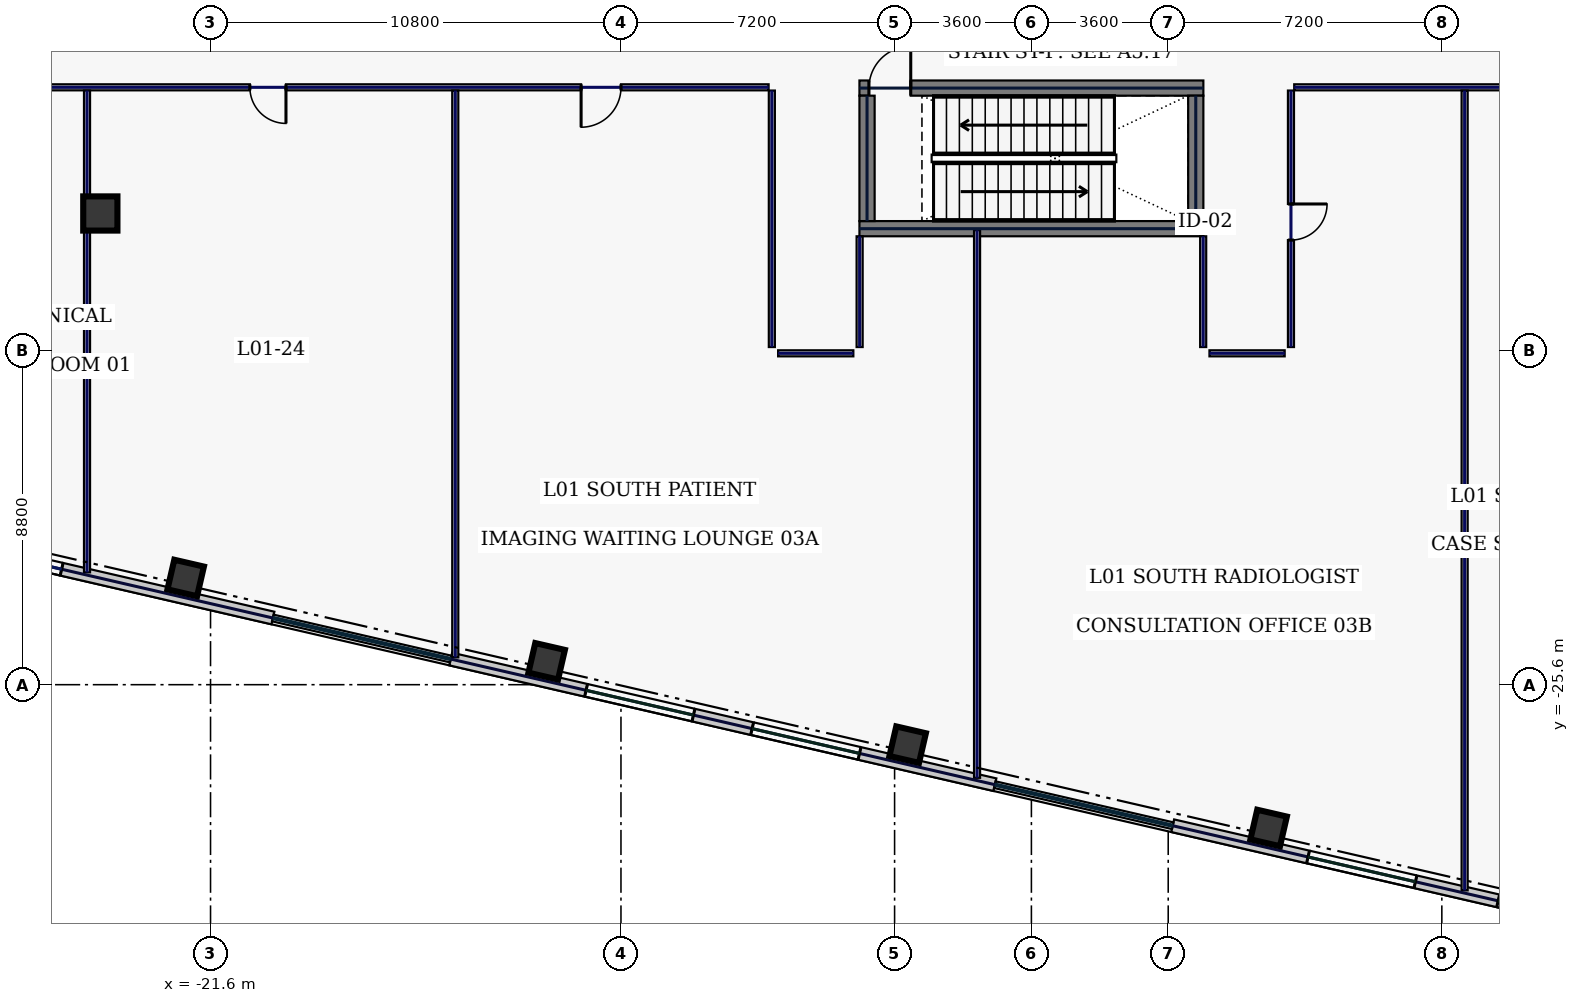
"""IFC4 building model, lengths in metres.
Left out: names, types, materials, properties, quantities, classifications, styles, units other than length and angle.
Written with IfcOpenShell. Run it as: python <this file> out.ifc"""

import sys

from ifc_helpers import new_model, si_unit, direction, frame, frame_2d, origin, origin_2d, place, context, subcontext, project, spatial, rectangle, hollow_rectangle, extrude, element, fill, save


model = new_model("IFC4")
c1 = context("Model", 3, precision=1e-05, world=origin(), true_north=direction((0.0, 1.0)))
c2 = subcontext(c1, "Body", "Model", "MODEL_VIEW")
j1 = project(units=[si_unit("LENGTHUNIT", "METRE"), si_unit("PLANEANGLEUNIT", "RADIAN")], contexts=[c1])
p1 = place(None, origin())
s1 = spatial("IfcSite", under=j1, at=p1, CompositionType="ELEMENT")
p2 = place(p1, origin())
s2 = spatial("IfcBuilding", under=s1, at=p2, CompositionType="ELEMENT")
p3 = place(p2, frame((0.0, 0.0, 8.4)))
s3 = spatial("IfcBuildingStorey", under=s2, at=p3, CompositionType="ELEMENT", Elevation=8.4)
p4 = place(p3, frame((-4.525, -13.6, 0.0), z_axis=(0.0, 0.0, 1.0), x_axis=(1.0, 0.0, 0.0)))
e1 = element("IfcWall", 1, at=p4, inside=s3, PredefinedType="SHEAR", context=c2, shape_type="SweptSolid", body=[
    extrude(rectangle(XDim=9.05, YDim=0.4, at=frame_2d((4.525, 0.0))), origin(), (0.0, 0.0, 1.0), 4.7),
])
p5 = place(p3, frame((-4.525, -9.9, 0.0), z_axis=(0.0, 0.0, 1.0), x_axis=(1.0, 0.0, 0.0)))
e2 = element("IfcWall", 2, at=p5, inside=s3, PredefinedType="SHEAR", context=c2, shape_type="SweptSolid", body=[
    extrude(rectangle(XDim=9.05, YDim=0.4, at=frame_2d((4.525, 0.0))), origin(), (0.0, 0.0, 1.0), 4.7),
])
p6 = place(p5, frame((0.25, 0.0, 0.0)))
e3 = element("IfcOpeningElement", 3, at=p6, cuts=e2, PredefinedType="OPENING", context=c2, shape_type="SweptSolid", body=[
    extrude(rectangle(XDim=1.1, YDim=2.2, at=frame_2d((0.55, 1.1))), frame((0.0, 0.21, 0.0), z_axis=(0.0, -1.0, 0.0), x_axis=(1.0, 0.0, 0.0)), (0.0, 0.0, 1.0), 0.42),
])
for number, where, z_axis, x_axis in (
    (4, (-4.325, -13.4, 0.0), (0.0, 0.0, 1.0), (0.0, 1.0, 0.0)),
    (5, (4.325, -13.4, 0.0), (0.0, 0.0, 1.0), (0.0, 1.0, 0.0)),
):
    element("IfcWall", number, at=place(p3, frame(where, z_axis=z_axis, x_axis=x_axis)), inside=s3, PredefinedType="SHEAR", context=c2, shape_type="SweptSolid", body=[
        extrude(rectangle(XDim=3.3, YDim=0.4, at=frame_2d((1.65, 0.0))), origin(), (0.0, 0.0, 1.0), 4.7),
    ])
p7 = place(p3, frame((-24.5, -13.2, 0.0), z_axis=(0.0, 0.0, 1.0), x_axis=(1.0, 0.0, 0.0)))
e6 = element("IfcColumn", 6, at=p7, inside=s3, PredefinedType="COLUMN", context=c2, shape_type="SweptSolid", body=[
    extrude(hollow_rectangle(XDim=0.9, YDim=0.9, WallThickness=0.04, at=origin_2d()), origin(), (0.0, 0.0, 1.0), 4.7),
])
for number, where, z_axis, x_axis in (
    (7, (-22.254, -22.792, 0.0), (0.0, 0.0, 1.0), (0.974, -0.225, 0.0)),
    (8, (-12.755, -24.985, 0.0), (0.0, 0.0, 1.0), (0.974, -0.225, 0.0)),
    (9, (-3.256, -27.178, 0.0), (0.0, 0.0, 1.0), (0.974, -0.225, 0.0)),
    (10, (6.242, -29.371, 0.0), (0.0, 0.0, 1.0), (0.974, -0.225, 0.0)),
):
    element("IfcColumn", number, at=place(p3, frame(where, z_axis=z_axis, x_axis=x_axis)), inside=s3, PredefinedType="COLUMN", context=c2, shape_type="SweptSolid", body=[
        extrude(hollow_rectangle(XDim=0.8, YDim=0.8, WallThickness=0.036, at=origin_2d()), origin(), (0.0, 0.0, 1.0), 4.7),
    ])
p8 = place(p3, frame((-42.029, -18.75, 0.0), z_axis=(0.0, 0.0, 1.0), x_axis=(0.97436993772, -0.224951604723, 0.0)))
e11 = element("IfcWall", 11, at=p8, inside=s3, PredefinedType="STANDARD", context=c2, shape_type="SweptSolid", body=[
    extrude(rectangle(XDim=22.651, YDim=0.34, at=frame_2d((11.326, 0.0))), origin(), (0.0, 0.0, 1.0), 4.7),
])
p9 = place(p8, frame((1.862, 0.0, 0.85)))
e12 = element("IfcOpeningElement", 12, at=p9, cuts=e11, PredefinedType="OPENING", context=c2, shape_type="SweptSolid", body=[
    extrude(rectangle(XDim=2.9, YDim=2.3, at=frame_2d((1.45, 1.15))), frame((0.0, 0.18, 0.0), z_axis=(0.0, -1.0, 0.0), x_axis=(1.0, 0.0, 0.0)), (0.0, 0.0, 1.0), 0.36),
])
p10 = place(p8, frame((6.346, 0.0, 0.85)))
e13 = element("IfcOpeningElement", 13, at=p10, cuts=e11, PredefinedType="OPENING", context=c2, shape_type="SweptSolid", body=[
    extrude(rectangle(XDim=2.9, YDim=2.3, at=frame_2d((1.45, 1.15))), frame((0.0, 0.18, 0.0), z_axis=(0.0, -1.0, 0.0), x_axis=(1.0, 0.0, 0.0)), (0.0, 0.0, 1.0), 0.36),
])
p11 = place(p8, frame((13.661, 0.0, 0.85)))
e14 = element("IfcOpeningElement", 14, at=p11, cuts=e11, PredefinedType="OPENING", context=c2, shape_type="SweptSolid", body=[
    extrude(rectangle(XDim=0.85, YDim=1.85, at=frame_2d((0.425, 0.925))), frame((0.0, 0.18, 0.0), z_axis=(0.0, -1.0, 0.0), x_axis=(1.0, 0.0, 0.0)), (0.0, 0.0, 1.0), 0.36),
])
p12 = place(p8, frame((16.095, 0.0, 0.85)))
e15 = element("IfcOpeningElement", 15, at=p12, cuts=e11, PredefinedType="OPENING", context=c2, shape_type="SweptSolid", body=[
    extrude(rectangle(XDim=0.85, YDim=1.85, at=frame_2d((0.425, 0.925))), frame((0.0, 0.18, 0.0), z_axis=(0.0, -1.0, 0.0), x_axis=(1.0, 0.0, 0.0)), (0.0, 0.0, 1.0), 0.36),
])
p13 = place(p3, frame((-15.281, -24.925, 0.0), z_axis=(0.0, 0.0, 1.0), x_axis=(0.974370193991, -0.22495049469, 0.0)))
e16 = element("IfcWall", 16, at=p13, inside=s3, PredefinedType="STANDARD", context=c2, shape_type="SweptSolid", body=[
    extrude(rectangle(XDim=14.697, YDim=0.34, at=frame_2d((7.349, 0.0))), origin(), (0.0, 0.0, 1.0), 4.7),
])
p14 = place(p13, frame((3.656, 0.0, 0.85)))
e17 = element("IfcOpeningElement", 17, at=p14, cuts=e16, PredefinedType="OPENING", context=c2, shape_type="SweptSolid", body=[
    extrude(rectangle(XDim=2.9, YDim=2.3, at=frame_2d((1.45, 1.15))), frame((0.0, 0.18, 0.0), z_axis=(0.0, -1.0, 0.0), x_axis=(1.0, 0.0, 0.0)), (0.0, 0.0, 1.0), 0.36),
])
p15 = place(p13, frame((8.141, 0.0, 0.85)))
e18 = element("IfcOpeningElement", 18, at=p15, cuts=e16, PredefinedType="OPENING", context=c2, shape_type="SweptSolid", body=[
    extrude(rectangle(XDim=2.9, YDim=2.3, at=frame_2d((1.45, 1.15))), frame((0.0, 0.18, 0.0), z_axis=(0.0, -1.0, 0.0), x_axis=(1.0, 0.0, 0.0)), (0.0, 0.0, 1.0), 0.36),
])
p16 = place(p3, frame((3.717, -29.311, 0.0), z_axis=(0.0, 0.0, 1.0), x_axis=(0.97436993772, -0.224951604723, 0.0)))
e19 = element("IfcWall", 19, at=p16, inside=s3, PredefinedType="STANDARD", context=c2, shape_type="SweptSolid", body=[
    extrude(rectangle(XDim=22.651, YDim=0.34, at=frame_2d((11.326, 0.0))), origin(), (0.0, 0.0, 1.0), 4.7),
])
p17 = place(p16, frame((3.656, 0.0, 0.85)))
e20 = element("IfcOpeningElement", 20, at=p17, cuts=e19, PredefinedType="OPENING", context=c2, shape_type="SweptSolid", body=[
    extrude(rectangle(XDim=2.9, YDim=2.3, at=frame_2d((1.45, 1.15))), frame((0.0, 0.18, 0.0), z_axis=(0.0, -1.0, 0.0), x_axis=(1.0, 0.0, 0.0)), (0.0, 0.0, 1.0), 0.36),
])
p18 = place(p16, frame((8.791, 0.0, 0.22)))
e21 = element("IfcOpeningElement", 21, at=p18, cuts=e19, PredefinedType="OPENING", context=c2, shape_type="SweptSolid", body=[
    extrude(rectangle(XDim=1.6, YDim=1.2, at=frame_2d((0.8, 0.6))), frame((0.0, 0.18, 0.0), z_axis=(0.0, -1.0, 0.0), x_axis=(1.0, 0.0, 0.0)), (0.0, 0.0, 1.0), 0.36),
])
p19 = place(p16, frame((14.055, 0.0, 0.22)))
e22 = element("IfcOpeningElement", 22, at=p19, cuts=e19, PredefinedType="OPENING", context=c2, shape_type="SweptSolid", body=[
    extrude(rectangle(XDim=1.6, YDim=1.2, at=frame_2d((0.8, 0.6))), frame((0.0, 0.18, 0.0), z_axis=(0.0, -1.0, 0.0), x_axis=(1.0, 0.0, 0.0)), (0.0, 0.0, 1.0), 0.36),
])
p20 = place(p16, frame((18.539, 0.0, 0.22)))
e23 = element("IfcOpeningElement", 23, at=p20, cuts=e19, PredefinedType="OPENING", context=c2, shape_type="SweptSolid", body=[
    extrude(rectangle(XDim=1.6, YDim=1.2, at=frame_2d((0.8, 0.6))), frame((0.0, 0.18, 0.0), z_axis=(0.0, -1.0, 0.0), x_axis=(1.0, 0.0, 0.0)), (0.0, 0.0, 1.0), 0.36),
])
p21 = place(p3, frame((29.415, -9.88, 0.0), z_axis=(0.0, 0.0, 1.0), x_axis=(-1.0, 0.0, 0.0)))
e24 = element("IfcWall", 24, at=p21, inside=s3, PredefinedType="PARTITIONING", context=c2, shape_type="SweptSolid", body=[
    extrude(rectangle(XDim=22.5, YDim=0.16, at=frame_2d((11.25, 0.0))), origin(), (0.0, 0.0, 1.0), 4.7),
])
p22 = place(p21, frame((15.025, 0.0, 0.0)))
e25 = element("IfcOpeningElement", 25, at=p22, cuts=e24, PredefinedType="OPENING", context=c2, shape_type="SweptSolid", body=[
    extrude(rectangle(XDim=0.95, YDim=2.2, at=frame_2d((0.475, 1.1))), frame((0.0, 0.09, 0.0), z_axis=(0.0, -1.0, 0.0), x_axis=(1.0, 0.0, 0.0)), (0.0, 0.0, 1.0), 0.18),
])
p23 = place(p21, frame((10.137, 0.0, 0.0)))
e26 = element("IfcOpeningElement", 26, at=p23, cuts=e24, PredefinedType="OPENING", context=c2, shape_type="SweptSolid", body=[
    extrude(rectangle(XDim=1.15, YDim=2.2, at=frame_2d((0.575, 1.1))), frame((0.0, 0.09, 0.0), z_axis=(0.0, -1.0, 0.0), x_axis=(1.0, 0.0, 0.0)), (0.0, 0.0, 1.0), 0.18),
])
p24 = place(p21, frame((6.012, 0.0, 0.0)))
e27 = element("IfcOpeningElement", 27, at=p24, cuts=e24, PredefinedType="OPENING", context=c2, shape_type="SweptSolid", body=[
    extrude(rectangle(XDim=0.95, YDim=2.2, at=frame_2d((0.475, 1.1))), frame((0.0, 0.09, 0.0), z_axis=(0.0, -1.0, 0.0), x_axis=(1.0, 0.0, 0.0)), (0.0, 0.0, 1.0), 0.18),
])
p25 = place(p21, frame((2.044, 0.0, 0.0)))
e28 = element("IfcOpeningElement", 28, at=p25, cuts=e24, PredefinedType="OPENING", context=c2, shape_type="SweptSolid", body=[
    extrude(rectangle(XDim=1.05, YDim=2.2, at=frame_2d((0.525, 1.1))), frame((0.0, 0.09, 0.0), z_axis=(0.0, -1.0, 0.0), x_axis=(1.0, 0.0, 0.0)), (0.0, 0.0, 1.0), 0.18),
])
p26 = place(p3, frame((6.83, -9.965, 0.0), z_axis=(0.0, 0.0, 1.0), x_axis=(0.0, -1.0, 0.0)))
e29 = element("IfcWall", 29, at=p26, inside=s3, PredefinedType="PARTITIONING", context=c2, shape_type="SweptSolid", body=[
    extrude(rectangle(XDim=6.75, YDim=0.16, at=frame_2d((3.375, 0.0))), origin(), (0.0, 0.0, 1.0), 4.7),
])
p27 = place(p26, frame((2.985, 0.0, 0.0)))
e30 = element("IfcOpeningElement", 30, at=p27, cuts=e29, PredefinedType="OPENING", context=c2, shape_type="SweptSolid", body=[
    extrude(rectangle(XDim=0.95, YDim=2.2, at=frame_2d((0.475, 1.1))), frame((0.0, 0.09, 0.0), z_axis=(0.0, -1.0, 0.0), x_axis=(1.0, 0.0, 0.0)), (0.0, 0.0, 1.0), 0.18),
])
p28 = place(p3, frame((6.665, -16.88, 0.0), z_axis=(0.0, 0.0, 1.0), x_axis=(-1.0, 0.0, 0.0)))
e31 = element("IfcWall", 31, at=p28, inside=s3, PredefinedType="PARTITIONING", context=c2, shape_type="SweptSolid", body=[
    extrude(rectangle(XDim=1.98, YDim=0.16, at=frame_2d((0.99, 0.0))), origin(), (0.0, 0.0, 1.0), 4.7),
])
for number, where, z_axis, x_axis in (
    (32, (4.52, -16.715, 0.0), (0.0, 0.0, 1.0), (0.0, 1.0, 0.0)),
    (33, (-4.52, -13.8, 0.0), (0.0, 0.0, 1.0), (0.0, -1.0, 0.0)),
):
    element("IfcWall", number, at=place(p3, frame(where, z_axis=z_axis, x_axis=x_axis)), inside=s3, PredefinedType="PARTITIONING", context=c2, shape_type="SweptSolid", body=[
        extrude(rectangle(XDim=2.915, YDim=0.16, at=frame_2d((1.458, 0.0))), origin(), (0.0, 0.0, 1.0), 4.7),
    ])
p29 = place(p3, frame((-4.685, -16.88, 0.0), z_axis=(0.0, 0.0, 1.0), x_axis=(-1.0, 0.0, 0.0)))
e34 = element("IfcWall", 34, at=p29, inside=s3, PredefinedType="PARTITIONING", context=c2, shape_type="SweptSolid", body=[
    extrude(rectangle(XDim=1.98, YDim=0.16, at=frame_2d((0.99, 0.0))), origin(), (0.0, 0.0, 1.0), 4.7),
])
p30 = place(p3, frame((-6.83, -16.715, 0.0), z_axis=(0.0, 0.0, 1.0), x_axis=(0.0, 1.0, 0.0)))
e35 = element("IfcWall", 35, at=p30, inside=s3, PredefinedType="PARTITIONING", context=c2, shape_type="SweptSolid", body=[
    extrude(rectangle(XDim=6.75, YDim=0.16, at=frame_2d((3.375, 0.0))), origin(), (0.0, 0.0, 1.0), 4.7),
])
p31 = place(p3, frame((-6.915, -9.88, 0.0), z_axis=(0.0, 0.0, 1.0), x_axis=(-1.0, 0.0, 0.0)))
e36 = element("IfcWall", 36, at=p31, inside=s3, PredefinedType="PARTITIONING", context=c2, shape_type="SweptSolid", body=[
    extrude(rectangle(XDim=22.5, YDim=0.16, at=frame_2d((11.25, 0.0))), origin(), (0.0, 0.0, 1.0), 4.7),
])
p32 = place(p31, frame((19.676, 0.0, 0.0)))
e37 = element("IfcOpeningElement", 37, at=p32, cuts=e36, PredefinedType="OPENING", context=c2, shape_type="SweptSolid", body=[
    extrude(rectangle(XDim=0.95, YDim=2.2, at=frame_2d((0.475, 1.1))), frame((0.0, 0.09, 0.0), z_axis=(0.0, -1.0, 0.0), x_axis=(1.0, 0.0, 0.0)), (0.0, 0.0, 1.0), 0.18),
])
p33 = place(p31, frame((12.7, 0.0, 0.0)))
e38 = element("IfcOpeningElement", 38, at=p33, cuts=e36, PredefinedType="OPENING", context=c2, shape_type="SweptSolid", body=[
    extrude(rectangle(XDim=0.95, YDim=2.2, at=frame_2d((0.475, 1.1))), frame((0.0, 0.09, 0.0), z_axis=(0.0, -1.0, 0.0), x_axis=(1.0, 0.0, 0.0)), (0.0, 0.0, 1.0), 0.18),
])
p34 = place(p31, frame((3.884, 0.0, 0.0)))
e39 = element("IfcOpeningElement", 39, at=p34, cuts=e36, PredefinedType="OPENING", context=c2, shape_type="SweptSolid", body=[
    extrude(rectangle(XDim=1.05, YDim=2.2, at=frame_2d((0.525, 1.1))), frame((0.0, 0.09, 0.0), z_axis=(0.0, -1.0, 0.0), x_axis=(1.0, 0.0, 0.0)), (0.0, 0.0, 1.0), 0.18),
])
p35 = place(p3, frame((-24.85, -22.644, 0.0), z_axis=(0.0, 0.0, 1.0), x_axis=(0.0, 1.0, 0.0)))
e40 = element("IfcWall", 40, at=p35, inside=s3, PredefinedType="PARTITIONING", context=c2, shape_type="SweptSolid", body=[
    extrude(rectangle(XDim=12.679, YDim=0.16, at=frame_2d((6.339, 0.0))), origin(), (0.0, 0.0, 1.0), 4.7),
])
p36 = place(p3, frame((-15.16, -24.881, 0.0), z_axis=(0.0, 0.0, 1.0), x_axis=(0.0, 1.0, 0.0)))
e41 = element("IfcWall", 41, at=p36, inside=s3, PredefinedType="PARTITIONING", context=c2, shape_type="SweptSolid", body=[
    extrude(rectangle(XDim=14.916, YDim=0.16, at=frame_2d((7.458, 0.0))), origin(), (0.0, 0.0, 1.0), 4.7),
])
p37 = place(p3, frame((11.4, -31.013, 0.0), z_axis=(0.0, 0.0, 1.0), x_axis=(0.0, 1.0, 0.0)))
e42 = element("IfcWall", 42, at=p37, inside=s3, PredefinedType="PARTITIONING", context=c2, shape_type="SweptSolid", body=[
    extrude(rectangle(XDim=21.048, YDim=0.16, at=frame_2d((10.524, 0.0))), origin(), (0.0, 0.0, 1.0), 4.7),
])
p38 = place(p3, frame((-1.43, -28.051, 0.0), z_axis=(0.0, 0.0, 1.0), x_axis=(0.0, 1.0, 0.0)))
e43 = element("IfcWall", 43, at=p38, inside=s3, PredefinedType="PARTITIONING", context=c2, shape_type="SweptSolid", body=[
    extrude(rectangle(XDim=14.411, YDim=0.16, at=frame_2d((7.206, 0.0))), origin(), (0.0, 0.0, 1.0), 4.7),
])
p39 = place(p12, origin())
e44 = element("IfcWindow", 44, at=p39, inside=s3, PartitioningType="SINGLE_PANEL", PredefinedType="WINDOW", context=c2, shape_type="SweptSolid", body=[
    extrude(rectangle(XDim=0.85, YDim=1.85, at=frame_2d((0.425, 0.925))), frame((0.0, 0.03, 0.0), z_axis=(0.0, -1.0, 0.0), x_axis=(1.0, 0.0, 0.0)), (0.0, 0.0, 1.0), 0.06),
])
fill(e15, e44)
p40 = place(p14, origin())
e45 = element("IfcWindow", 45, at=p40, inside=s3, PartitioningType="SINGLE_PANEL", PredefinedType="WINDOW", context=c2, shape_type="SweptSolid", body=[
    extrude(rectangle(XDim=2.9, YDim=2.3, at=frame_2d((1.45, 1.15))), frame((0.0, 0.03, 0.0), z_axis=(0.0, -1.0, 0.0), x_axis=(1.0, 0.0, 0.0)), (0.0, 0.0, 1.0), 0.06),
])
fill(e17, e45)
p41 = place(p15, origin())
e46 = element("IfcWindow", 46, at=p41, inside=s3, PartitioningType="SINGLE_PANEL", PredefinedType="WINDOW", context=c2, shape_type="SweptSolid", body=[
    extrude(rectangle(XDim=2.9, YDim=2.3, at=frame_2d((1.45, 1.15))), frame((0.0, 0.03, 0.0), z_axis=(0.0, -1.0, 0.0), x_axis=(1.0, 0.0, 0.0)), (0.0, 0.0, 1.0), 0.06),
])
fill(e18, e46)
p42 = place(p17, origin())
e47 = element("IfcWindow", 47, at=p42, inside=s3, PartitioningType="SINGLE_PANEL", PredefinedType="WINDOW", context=c2, shape_type="SweptSolid", body=[
    extrude(rectangle(XDim=2.9, YDim=2.3, at=frame_2d((1.45, 1.15))), frame((0.0, 0.03, 0.0), z_axis=(0.0, -1.0, 0.0), x_axis=(1.0, 0.0, 0.0)), (0.0, 0.0, 1.0), 0.06),
])
fill(e20, e47)
p43 = place(p18, origin())
e48 = element("IfcWindow", 48, at=p43, inside=s3, PartitioningType="SINGLE_PANEL", PredefinedType="WINDOW", context=c2, shape_type="SweptSolid", body=[
    extrude(rectangle(XDim=1.6, YDim=1.2, at=frame_2d((0.8, 0.6))), frame((0.0, 0.03, 0.0), z_axis=(0.0, -1.0, 0.0), x_axis=(1.0, 0.0, 0.0)), (0.0, 0.0, 1.0), 0.06),
])
fill(e21, e48)
p44 = place(p6, origin())
e49 = element("IfcDoor", 49, at=p44, inside=s3, OperationType="SINGLE_SWING_RIGHT", PredefinedType="DOOR", context=c2, shape_type="SweptSolid", body=[
    extrude(rectangle(XDim=1.1, YDim=2.2, at=frame_2d((0.55, 1.1))), frame((0.0, 0.025, 0.0), z_axis=(0.0, -1.0, 0.0), x_axis=(1.0, 0.0, 0.0)), (0.0, 0.0, 1.0), 0.05),
])
fill(e3, e49)
p45 = place(p33, origin())
e50 = element("IfcDoor", 50, at=p45, inside=s3, OperationType="SINGLE_SWING_LEFT", PredefinedType="DOOR", context=c2, shape_type="SweptSolid", body=[
    extrude(rectangle(XDim=0.95, YDim=2.2, at=frame_2d((0.475, 1.1))), frame((0.0, 0.025, 0.0), z_axis=(0.0, -1.0, 0.0), x_axis=(1.0, 0.0, 0.0)), (0.0, 0.0, 1.0), 0.05),
])
fill(e38, e50)
p46 = place(p34, origin())
e51 = element("IfcDoor", 51, at=p46, inside=s3, OperationType="SINGLE_SWING_RIGHT", PredefinedType="DOOR", context=c2, shape_type="SweptSolid", body=[
    extrude(rectangle(XDim=1.05, YDim=2.2, at=frame_2d((0.525, 1.1))), frame((0.0, 0.025, 0.0), z_axis=(0.0, -1.0, 0.0), x_axis=(1.0, 0.0, 0.0)), (0.0, 0.0, 1.0), 0.05),
])
fill(e39, e51)
p47 = place(p27, origin())
e52 = element("IfcDoor", 52, at=p47, inside=s3, OperationType="SINGLE_SWING_LEFT", PredefinedType="DOOR", context=c2, shape_type="SweptSolid", body=[
    extrude(rectangle(XDim=0.95, YDim=2.2, at=frame_2d((0.475, 1.1))), frame((0.0, 0.025, 0.0), z_axis=(0.0, -1.0, 0.0), x_axis=(1.0, 0.0, 0.0)), (0.0, 0.0, 1.0), 0.05),
])
fill(e30, e52)
save(model, sys.argv[1])
